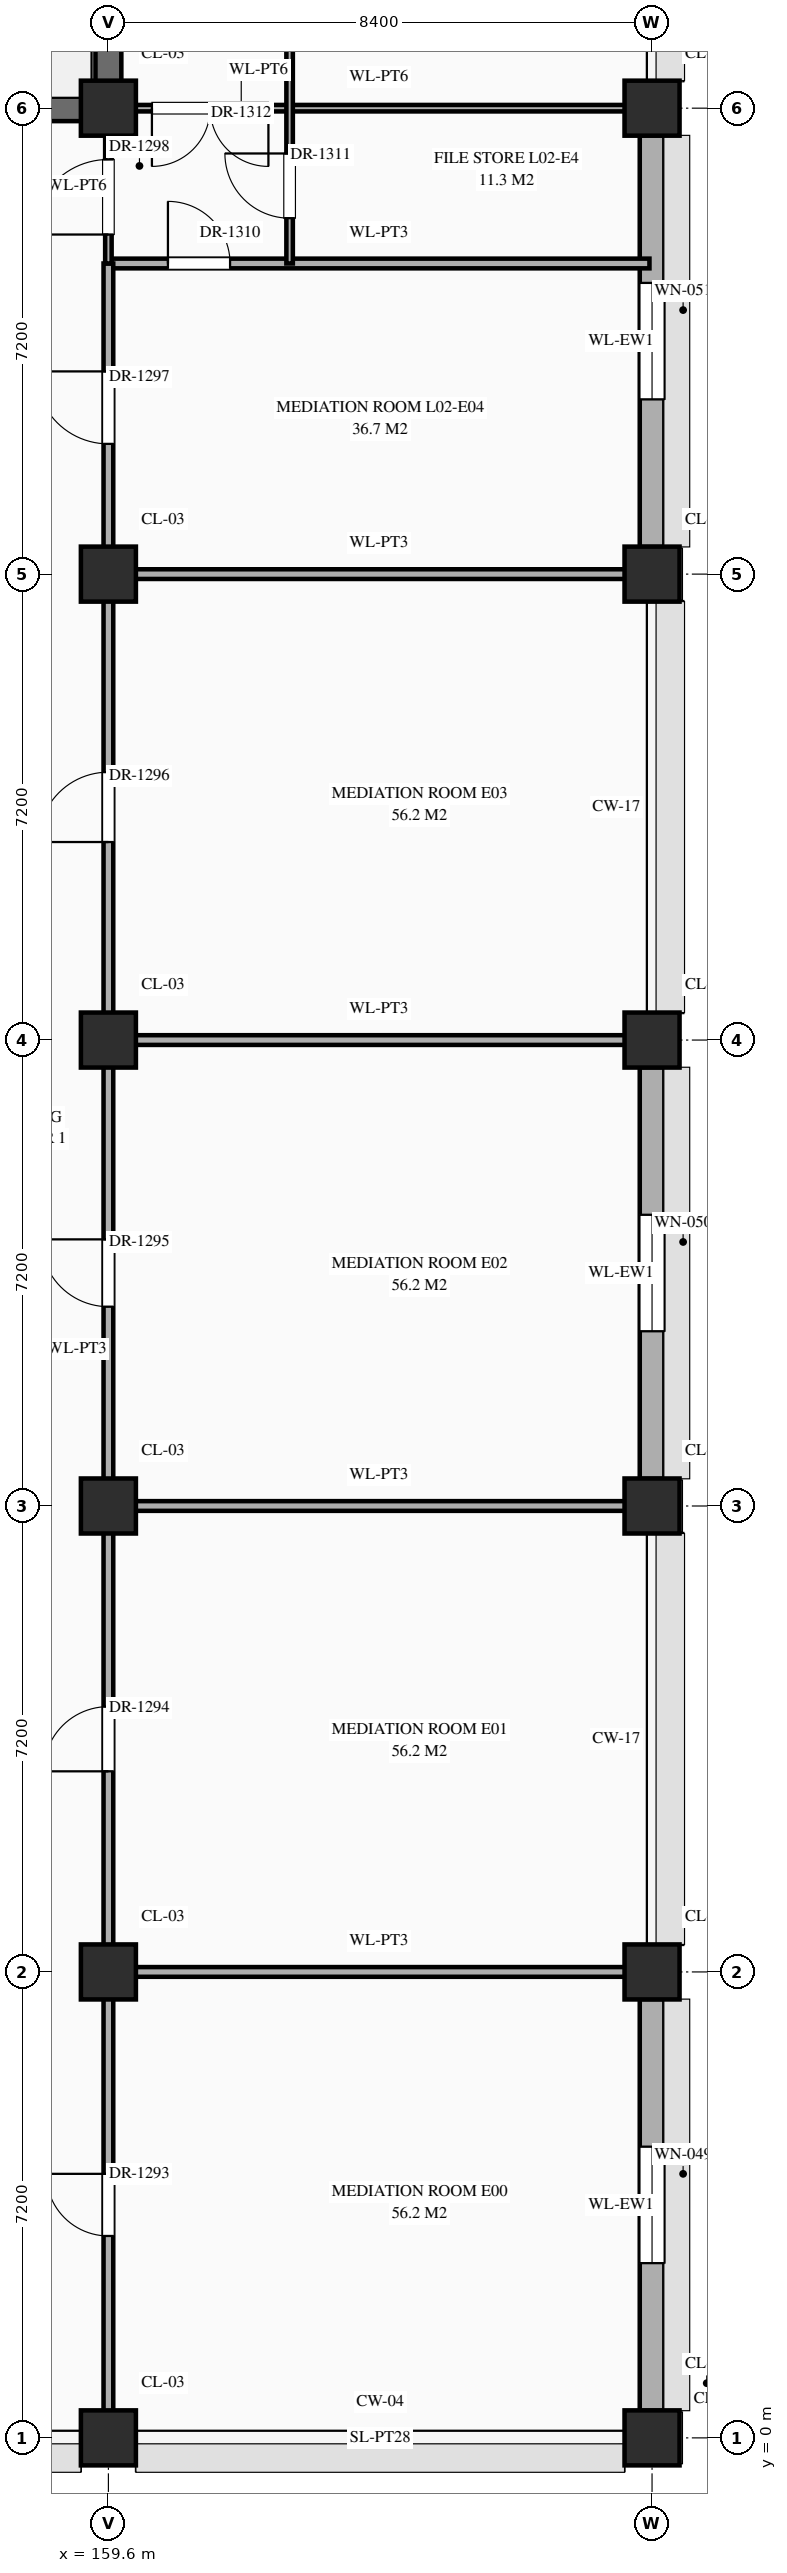
"""IFC4 building model, lengths in metres.
Left out: names, types, materials, properties, quantities, classifications, styles, units other than length and angle.
Written with IfcOpenShell. Run it as: python <this file> out.ifc"""

import sys

from ifc_helpers import new_model, si_unit, direction, frame, frame_2d, origin, origin_2d, place, context, subcontext, project, spatial, rectangle, extrude, element, fill, save


model = new_model("IFC4")
c1 = context("Model", 3, precision=1e-05, world=origin(), true_north=direction((0.0, 1.0)))
c2 = subcontext(c1, "Body", "Model", "MODEL_VIEW")
j1 = project(units=[si_unit("LENGTHUNIT", "METRE"), si_unit("PLANEANGLEUNIT", "RADIAN")], contexts=[c1])
p1 = place(None, origin())
s1 = spatial("IfcSite", under=j1, at=p1, CompositionType="ELEMENT")
p2 = place(p1, origin())
s2 = spatial("IfcBuilding", under=s1, at=p2, CompositionType="ELEMENT")
p3 = place(p2, frame((0.0, 0.0, 5.4)))
s3 = spatial("IfcBuildingStorey", under=s2, at=p3, CompositionType="ELEMENT", Elevation=5.4)
for number, where, z_axis, x_axis in (
    (1, (159.6, 0.0, 0.0), (0.0, 0.0, 1.0), (1.0, 0.0, 0.0)),
    (2, (159.6, 7.2, 0.0), (0.0, 0.0, 1.0), (1.0, 0.0, 0.0)),
    (3, (159.6, 14.4, 0.0), (0.0, 0.0, 1.0), (1.0, 0.0, 0.0)),
    (4, (159.6, 21.6, 0.0), (0.0, 0.0, 1.0), (1.0, 0.0, 0.0)),
    (5, (159.6, 28.8, 0.0), (0.0, 0.0, 1.0), (1.0, 0.0, 0.0)),
    (6, (159.6, 36.0, 0.0), (0.0, 0.0, 1.0), (1.0, 0.0, 0.0)),
    (7, (168.0, 0.0, 0.0), (0.0, 0.0, 1.0), (1.0, 0.0, 0.0)),
    (8, (168.0, 7.2, 0.0), (0.0, 0.0, 1.0), (1.0, 0.0, 0.0)),
    (9, (168.0, 14.4, 0.0), (0.0, 0.0, 1.0), (1.0, 0.0, 0.0)),
    (10, (168.0, 21.6, 0.0), (0.0, 0.0, 1.0), (1.0, 0.0, 0.0)),
    (11, (168.0, 28.8, 0.0), (0.0, 0.0, 1.0), (1.0, 0.0, 0.0)),
    (12, (168.0, 36.0, 0.0), (0.0, 0.0, 1.0), (1.0, 0.0, 0.0)),
):
    element("IfcColumn", number, at=place(p3, frame(where, z_axis=z_axis, x_axis=x_axis)), inside=s3, PredefinedType="COLUMN", context=c2, shape_type="SweptSolid", body=[
        extrude(rectangle(XDim=0.85, YDim=0.85, at=origin_2d()), origin(), (0.0, 0.0, 1.0), 5.4),
    ])
p4 = place(p3, frame((168.0, 0.42, 0.0), z_axis=(0.0, 0.0, 1.0), x_axis=(0.0, 1.0, 0.0)))
e13 = element("IfcWall", 13, at=p4, inside=s3, PredefinedType="STANDARD", context=c2, shape_type="SweptSolid", body=[
    extrude(rectangle(XDim=6.36, YDim=0.38, at=frame_2d((3.18, 0.0))), origin(), (0.0, 0.0, 1.0), 4.4),
])
p5 = place(p4, frame((2.28, 0.0, 0.85)))
e14 = element("IfcOpeningElement", 14, at=p5, cuts=e13, PredefinedType="OPENING", context=c2, shape_type="SweptSolid", body=[
    extrude(rectangle(XDim=1.8, YDim=1.2, at=frame_2d((0.9, 0.6))), frame((0.0, 0.202, 0.0), z_axis=(0.0, -1.0, 0.0), x_axis=(1.0, 0.0, 0.0)), (0.0, 0.0, 1.0), 0.404),
])
p6 = place(p3, frame((168.0, 14.82, 0.0), z_axis=(0.0, 0.0, 1.0), x_axis=(0.0, 1.0, 0.0)))
e15 = element("IfcWall", 15, at=p6, inside=s3, PredefinedType="STANDARD", context=c2, shape_type="SweptSolid", body=[
    extrude(rectangle(XDim=6.36, YDim=0.38, at=frame_2d((3.18, 0.0))), origin(), (0.0, 0.0, 1.0), 4.4),
])
p7 = place(p6, frame((2.28, 0.0, 0.85)))
e16 = element("IfcOpeningElement", 16, at=p7, cuts=e15, PredefinedType="OPENING", context=c2, shape_type="SweptSolid", body=[
    extrude(rectangle(XDim=1.8, YDim=1.56, at=frame_2d((0.9, 0.78))), frame((0.0, 0.202, 0.0), z_axis=(0.0, -1.0, 0.0), x_axis=(1.0, 0.0, 0.0)), (0.0, 0.0, 1.0), 0.404),
])
p8 = place(p3, frame((168.0, 29.22, 0.0), z_axis=(0.0, 0.0, 1.0), x_axis=(0.0, 1.0, 0.0)))
e17 = element("IfcWall", 17, at=p8, inside=s3, PredefinedType="STANDARD", context=c2, shape_type="SweptSolid", body=[
    extrude(rectangle(XDim=6.36, YDim=0.38, at=frame_2d((3.18, 0.0))), origin(), (0.0, 0.0, 1.0), 4.4),
])
p9 = place(p8, frame((2.28, 0.0, 0.85)))
e18 = element("IfcOpeningElement", 18, at=p9, cuts=e17, PredefinedType="OPENING", context=c2, shape_type="SweptSolid", body=[
    extrude(rectangle(XDim=1.8, YDim=1.92, at=frame_2d((0.9, 0.96))), frame((0.0, 0.202, 0.0), z_axis=(0.0, -1.0, 0.0), x_axis=(1.0, 0.0, 0.0)), (0.0, 0.0, 1.0), 0.404),
])
for number, where, z_axis, x_axis in (
    (19, (159.6, 7.2, 0.0), (0.0, 0.0, 1.0), (1.0, 0.0, 0.0)),
    (20, (159.6, 14.4, 0.0), (0.0, 0.0, 1.0), (1.0, 0.0, 0.0)),
    (21, (159.6, 21.6, 0.0), (0.0, 0.0, 1.0), (1.0, 0.0, 0.0)),
    (22, (159.6, 28.8, 0.0), (0.0, 0.0, 1.0), (1.0, 0.0, 0.0)),
):
    element("IfcWall", number, at=place(p3, frame(where, z_axis=z_axis, x_axis=x_axis)), inside=s3, PredefinedType="STANDARD", context=c2, shape_type="SweptSolid", body=[
        extrude(rectangle(XDim=8.36, YDim=0.15, at=frame_2d((4.18, 0.0))), origin(), (0.0, 0.0, 1.0), 4.2),
    ])
p10 = place(p3, frame((159.6, 33.6, 0.0), z_axis=(0.0, 0.0, 1.0), x_axis=(1.0, 0.0, 0.0)))
e23 = element("IfcWall", 23, at=p10, inside=s3, PredefinedType="STANDARD", context=c2, shape_type="SweptSolid", body=[
    extrude(rectangle(XDim=8.36, YDim=0.15, at=frame_2d((4.18, 0.0))), origin(), (0.0, 0.0, 1.0), 5.05),
])
p11 = place(p10, frame((0.92, 0.0, 0.0)))
e24 = element("IfcOpeningElement", 24, at=p11, cuts=e23, PredefinedType="OPENING", context=c2, shape_type="SweptSolid", body=[
    extrude(rectangle(XDim=0.96, YDim=2.2, at=frame_2d((0.48, 1.1))), frame((0.0, 0.087, 0.0), z_axis=(0.0, -1.0, 0.0), x_axis=(1.0, 0.0, 0.0)), (0.0, 0.0, 1.0), 0.174),
])
p12 = place(p3, frame((151.24, 36.0, 0.0), z_axis=(0.0, 0.0, 1.0), x_axis=(1.0, 0.0, 0.0)))
e25 = element("IfcWall", 25, at=p12, inside=s3, PredefinedType="SHEAR", context=c2, shape_type="SweptSolid", body=[
    extrude(rectangle(XDim=8.36, YDim=0.4, at=frame_2d((4.18, 0.0))), origin(), (0.0, 0.0, 1.0), 5.05),
])
p13 = place(p3, frame((159.6, 36.0, 0.0), z_axis=(0.0, 0.0, 1.0), x_axis=(1.0, 0.0, 0.0)))
e26 = element("IfcWall", 26, at=p13, inside=s3, PredefinedType="STANDARD", context=c2, shape_type="SweptSolid", body=[
    extrude(rectangle(XDim=8.36, YDim=0.1, at=frame_2d((4.18, 0.0))), origin(), (0.0, 0.0, 1.0), 4.2),
])
p14 = place(p13, frame((0.673, 0.0, 0.0)))
e27 = element("IfcOpeningElement", 27, at=p14, cuts=e26, PredefinedType="OPENING", context=c2, shape_type="SweptSolid", body=[
    extrude(rectangle(XDim=1.8, YDim=2.5, at=frame_2d((0.9, 1.25))), frame((0.0, 0.062, 0.0), z_axis=(0.0, -1.0, 0.0), x_axis=(1.0, 0.0, 0.0)), (0.0, 0.0, 1.0), 0.124),
])
p15 = place(p3, frame((159.6, 0.04, 0.0), z_axis=(0.0, 0.0, 1.0), x_axis=(0.0, 1.0, 0.0)))
e28 = element("IfcWall", 28, at=p15, inside=s3, PredefinedType="STANDARD", context=c2, shape_type="SweptSolid", body=[
    extrude(rectangle(XDim=33.56, YDim=0.15, at=frame_2d((16.78, 0.0))), origin(), (0.0, 0.0, 1.0), 4.3),
])
p16 = place(p15, frame((3.08, 0.0, 0.0)))
e29 = element("IfcOpeningElement", 29, at=p16, cuts=e28, PredefinedType="OPENING", context=c2, shape_type="SweptSolid", body=[
    extrude(rectangle(XDim=0.96, YDim=2.2, at=frame_2d((0.48, 1.1))), frame((0.0, 0.087, 0.0), z_axis=(0.0, -1.0, 0.0), x_axis=(1.0, 0.0, 0.0)), (0.0, 0.0, 1.0), 0.174),
])
p17 = place(p15, frame((10.26, 0.0, 0.0)))
e30 = element("IfcOpeningElement", 30, at=p17, cuts=e28, PredefinedType="OPENING", context=c2, shape_type="SweptSolid", body=[
    extrude(rectangle(XDim=1.0, YDim=2.25, at=frame_2d((0.5, 1.125))), frame((0.0, 0.087, 0.0), z_axis=(0.0, -1.0, 0.0), x_axis=(1.0, 0.0, 0.0)), (0.0, 0.0, 1.0), 0.174),
])
p18 = place(p15, frame((17.44, 0.0, 0.0)))
e31 = element("IfcOpeningElement", 31, at=p18, cuts=e28, PredefinedType="OPENING", context=c2, shape_type="SweptSolid", body=[
    extrude(rectangle(XDim=1.04, YDim=2.2, at=frame_2d((0.52, 1.1))), frame((0.0, 0.087, 0.0), z_axis=(0.0, -1.0, 0.0), x_axis=(1.0, 0.0, 0.0)), (0.0, 0.0, 1.0), 0.174),
])
p19 = place(p15, frame((24.62, 0.0, 0.0)))
e32 = element("IfcOpeningElement", 32, at=p19, cuts=e28, PredefinedType="OPENING", context=c2, shape_type="SweptSolid", body=[
    extrude(rectangle(XDim=1.08, YDim=2.25, at=frame_2d((0.54, 1.125))), frame((0.0, 0.087, 0.0), z_axis=(0.0, -1.0, 0.0), x_axis=(1.0, 0.0, 0.0)), (0.0, 0.0, 1.0), 0.174),
])
p20 = place(p15, frame((30.772, 0.0, 0.0)))
e33 = element("IfcOpeningElement", 33, at=p20, cuts=e28, PredefinedType="OPENING", context=c2, shape_type="SweptSolid", body=[
    extrude(rectangle(XDim=1.12, YDim=2.25, at=frame_2d((0.56, 1.125))), frame((0.0, 0.087, 0.0), z_axis=(0.0, -1.0, 0.0), x_axis=(1.0, 0.0, 0.0)), (0.0, 0.0, 1.0), 0.174),
])
p21 = place(p3, frame((159.6, 33.6, 0.0), z_axis=(0.0, 0.0, 1.0), x_axis=(0.0, 1.0, 0.0)))
e34 = element("IfcWall", 34, at=p21, inside=s3, PredefinedType="STANDARD", context=c2, shape_type="SweptSolid", body=[
    extrude(rectangle(XDim=2.4, YDim=0.1, at=frame_2d((1.2, 0.0))), origin(), (0.0, 0.0, 1.0), 4.3),
])
p22 = place(p21, frame((0.448, 0.0, 0.0)))
e35 = element("IfcOpeningElement", 35, at=p22, cuts=e34, PredefinedType="OPENING", context=c2, shape_type="SweptSolid", body=[
    extrude(rectangle(XDim=1.16, YDim=2.3, at=frame_2d((0.58, 1.15))), frame((0.0, 0.062, 0.0), z_axis=(0.0, -1.0, 0.0), x_axis=(1.0, 0.0, 0.0)), (0.0, 0.0, 1.0), 0.124),
])
p23 = place(p3, frame((159.6, 36.0, 0.0), z_axis=(0.0, 0.0, 1.0), x_axis=(0.0, 1.0, 0.0)))
e36 = element("IfcWall", 36, at=p23, inside=s3, PredefinedType="SHEAR", context=c2, shape_type="SweptSolid", body=[
    extrude(rectangle(XDim=4.8, YDim=0.4, at=frame_2d((2.4, 0.0))), origin(), (0.0, 0.0, 1.0), 5.12),
])
p24 = place(p3, frame((162.4, 33.6, 0.0), z_axis=(0.0, 0.0, 1.0), x_axis=(0.0, 1.0, 0.0)))
e37 = element("IfcWall", 37, at=p24, inside=s3, PredefinedType="STANDARD", context=c2, shape_type="SweptSolid", body=[
    extrude(rectangle(XDim=12.0, YDim=0.1, at=frame_2d((6.0, 0.0))), origin(), (0.0, 0.0, 1.0), 5.12),
])
p25 = place(p24, frame((0.7, 0.0, 0.0)))
e38 = element("IfcOpeningElement", 38, at=p25, cuts=e37, PredefinedType="OPENING", context=c2, shape_type="SweptSolid", body=[
    extrude(rectangle(XDim=1.0, YDim=2.25, at=frame_2d((0.5, 1.125))), frame((0.0, 0.062, 0.0), z_axis=(0.0, -1.0, 0.0), x_axis=(1.0, 0.0, 0.0)), (0.0, 0.0, 1.0), 0.124),
])
p26 = place(p24, frame((5.46, 0.0, 0.0)))
e39 = element("IfcOpeningElement", 39, at=p26, cuts=e37, PredefinedType="OPENING", context=c2, shape_type="SweptSolid", body=[
    extrude(rectangle(XDim=1.08, YDim=2.25, at=frame_2d((0.54, 1.125))), frame((0.0, 0.062, 0.0), z_axis=(0.0, -1.0, 0.0), x_axis=(1.0, 0.0, 0.0)), (0.0, 0.0, 1.0), 0.124),
])
p27 = place(p24, frame((10.22, 0.0, 0.0)))
e40 = element("IfcOpeningElement", 40, at=p27, cuts=e37, PredefinedType="OPENING", context=c2, shape_type="SweptSolid", body=[
    extrude(rectangle(XDim=1.16, YDim=2.3, at=frame_2d((0.58, 1.15))), frame((0.0, 0.062, 0.0), z_axis=(0.0, -1.0, 0.0), x_axis=(1.0, 0.0, 0.0)), (0.0, 0.0, 1.0), 0.124),
])
p28 = place(p5, origin())
e41 = element("IfcWindow", 41, at=p28, inside=s3, PartitioningType="SINGLE_PANEL", PredefinedType="WINDOW", context=c2, shape_type="SweptSolid", body=[
    extrude(rectangle(XDim=1.8, YDim=1.2, at=frame_2d((0.9, 0.6))), frame((0.0, 0.03, 0.0), z_axis=(0.0, -1.0, 0.0), x_axis=(1.0, 0.0, 0.0)), (0.0, 0.0, 1.0), 0.06),
])
fill(e14, e41)
p29 = place(p7, origin())
e42 = element("IfcWindow", 42, at=p29, inside=s3, PartitioningType="SINGLE_PANEL", PredefinedType="WINDOW", context=c2, shape_type="SweptSolid", body=[
    extrude(rectangle(XDim=1.8, YDim=1.56, at=frame_2d((0.9, 0.78))), frame((0.0, 0.03, 0.0), z_axis=(0.0, -1.0, 0.0), x_axis=(1.0, 0.0, 0.0)), (0.0, 0.0, 1.0), 0.06),
])
fill(e16, e42)
p30 = place(p9, origin())
e43 = element("IfcWindow", 43, at=p30, inside=s3, PartitioningType="SINGLE_PANEL", PredefinedType="WINDOW", context=c2, shape_type="SweptSolid", body=[
    extrude(rectangle(XDim=1.8, YDim=1.92, at=frame_2d((0.9, 0.96))), frame((0.0, 0.03, 0.0), z_axis=(0.0, -1.0, 0.0), x_axis=(1.0, 0.0, 0.0)), (0.0, 0.0, 1.0), 0.06),
])
fill(e18, e43)
p31 = place(p16, origin())
e44 = element("IfcDoor", 44, at=p31, inside=s3, OperationType="SINGLE_SWING_RIGHT", PredefinedType="DOOR", context=c2, shape_type="SweptSolid", body=[
    extrude(rectangle(XDim=0.96, YDim=2.2, at=frame_2d((0.48, 1.1))), frame((0.0, 0.025, 0.0), z_axis=(0.0, -1.0, 0.0), x_axis=(1.0, 0.0, 0.0)), (0.0, 0.0, 1.0), 0.05),
])
fill(e29, e44)
p32 = place(p17, origin())
e45 = element("IfcDoor", 45, at=p32, inside=s3, OperationType="SINGLE_SWING_LEFT", PredefinedType="DOOR", context=c2, shape_type="SweptSolid", body=[
    extrude(rectangle(XDim=1.0, YDim=2.25, at=frame_2d((0.5, 1.125))), frame((0.0, 0.025, 0.0), z_axis=(0.0, -1.0, 0.0), x_axis=(1.0, 0.0, 0.0)), (0.0, 0.0, 1.0), 0.05),
])
fill(e30, e45)
p33 = place(p18, origin())
e46 = element("IfcDoor", 46, at=p33, inside=s3, OperationType="SINGLE_SWING_RIGHT", PredefinedType="DOOR", context=c2, shape_type="SweptSolid", body=[
    extrude(rectangle(XDim=1.04, YDim=2.2, at=frame_2d((0.52, 1.1))), frame((0.0, 0.025, 0.0), z_axis=(0.0, -1.0, 0.0), x_axis=(1.0, 0.0, 0.0)), (0.0, 0.0, 1.0), 0.05),
])
fill(e31, e46)
p34 = place(p19, origin())
e47 = element("IfcDoor", 47, at=p34, inside=s3, OperationType="SINGLE_SWING_LEFT", PredefinedType="DOOR", context=c2, shape_type="SweptSolid", body=[
    extrude(rectangle(XDim=1.08, YDim=2.25, at=frame_2d((0.54, 1.125))), frame((0.0, 0.025, 0.0), z_axis=(0.0, -1.0, 0.0), x_axis=(1.0, 0.0, 0.0)), (0.0, 0.0, 1.0), 0.05),
])
fill(e32, e47)
p35 = place(p20, origin())
e48 = element("IfcDoor", 48, at=p35, inside=s3, OperationType="SINGLE_SWING_RIGHT", PredefinedType="DOOR", context=c2, shape_type="SweptSolid", body=[
    extrude(rectangle(XDim=1.12, YDim=2.25, at=frame_2d((0.56, 1.125))), frame((0.0, 0.025, 0.0), z_axis=(0.0, -1.0, 0.0), x_axis=(1.0, 0.0, 0.0)), (0.0, 0.0, 1.0), 0.05),
])
fill(e33, e48)
p36 = place(p22, origin())
e49 = element("IfcDoor", 49, at=p36, inside=s3, OperationType="SINGLE_SWING_LEFT", PredefinedType="DOOR", context=c2, shape_type="SweptSolid", body=[
    extrude(rectangle(XDim=1.16, YDim=2.3, at=frame_2d((0.58, 1.15))), frame((0.0, 0.025, 0.0), z_axis=(0.0, -1.0, 0.0), x_axis=(1.0, 0.0, 0.0)), (0.0, 0.0, 1.0), 0.05),
])
fill(e35, e49)
p37 = place(p11, origin())
e50 = element("IfcDoor", 50, at=p37, inside=s3, OperationType="SINGLE_SWING_LEFT", PredefinedType="DOOR", context=c2, shape_type="SweptSolid", body=[
    extrude(rectangle(XDim=0.96, YDim=2.2, at=frame_2d((0.48, 1.1))), frame((0.0, 0.025, 0.0), z_axis=(0.0, -1.0, 0.0), x_axis=(1.0, 0.0, 0.0)), (0.0, 0.0, 1.0), 0.05),
])
fill(e24, e50)
p38 = place(p25, origin())
e51 = element("IfcDoor", 51, at=p38, inside=s3, OperationType="SINGLE_SWING_RIGHT", PredefinedType="DOOR", context=c2, shape_type="SweptSolid", body=[
    extrude(rectangle(XDim=1.0, YDim=2.25, at=frame_2d((0.5, 1.125))), frame((0.0, 0.025, 0.0), z_axis=(0.0, -1.0, 0.0), x_axis=(1.0, 0.0, 0.0)), (0.0, 0.0, 1.0), 0.05),
])
fill(e38, e51)
p39 = place(p14, frame((1.8, 0.0, 0.0), z_axis=(0.0, 0.0, 1.0), x_axis=(-1.0, 0.0, 0.0)))
e52 = element("IfcDoor", 52, at=p39, inside=s3, OperationType="DOUBLE_DOOR_SINGLE_SWING", PredefinedType="DOOR", context=c2, shape_type="SweptSolid", body=[
    extrude(rectangle(XDim=1.8, YDim=2.5, at=frame_2d((0.9, 1.25))), frame((0.0, 0.025, 0.0), z_axis=(0.0, -1.0, 0.0), x_axis=(1.0, 0.0, 0.0)), (0.0, 0.0, 1.0), 0.05),
])
fill(e27, e52)
save(model, sys.argv[1])
